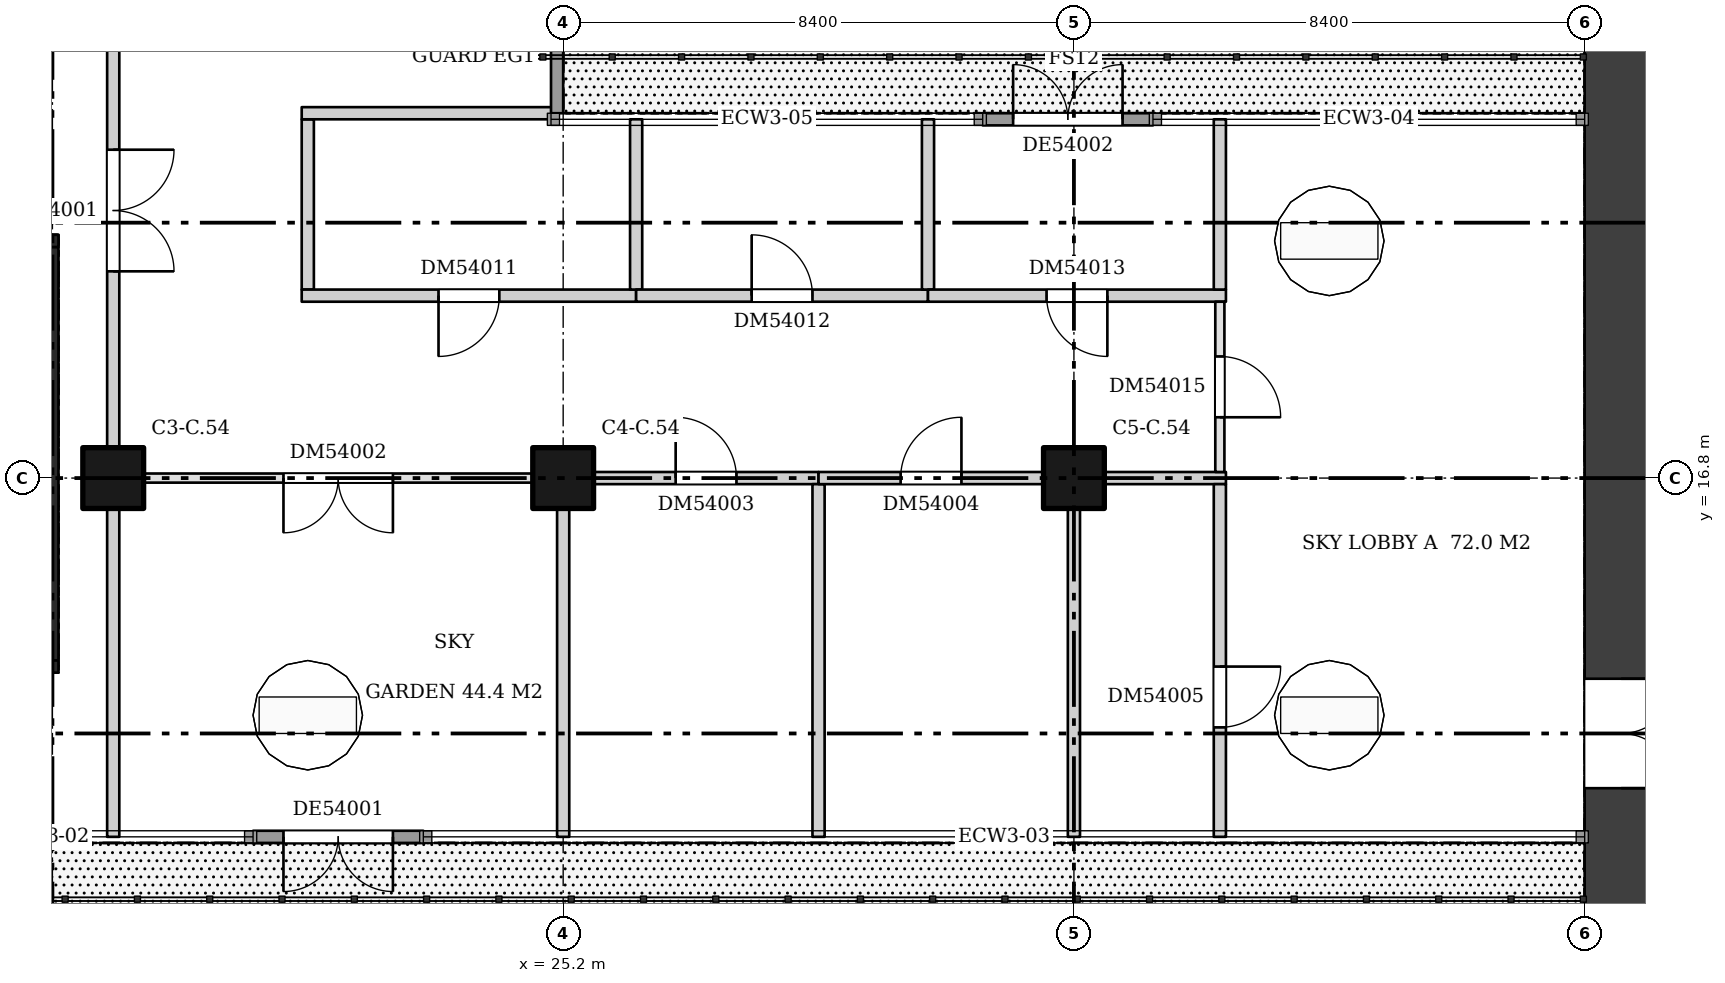
"""IFC4 building model, lengths in metres.
Left out: names, types, materials, properties, quantities, classifications, styles, units other than length and angle.
Written with IfcOpenShell. Run it as: python <this file> out.ifc"""

import sys

from ifc_helpers import new_model, si_unit, direction, frame, frame_2d, origin, origin_2d, place, context, subcontext, project, spatial, rectangle, extrude, element, fill, save


model = new_model("IFC4")
c1 = context("Model", 3, precision=1e-05, world=origin(), true_north=direction((0.0, 1.0)))
c2 = subcontext(c1, "Body", "Model", "MODEL_VIEW")
j1 = project(units=[si_unit("LENGTHUNIT", "METRE"), si_unit("PLANEANGLEUNIT", "RADIAN")], contexts=[c1])
p1 = place(None, origin())
s1 = spatial("IfcSite", under=j1, at=p1, CompositionType="ELEMENT")
p2 = place(p1, origin())
s2 = spatial("IfcBuilding", under=s1, at=p2, CompositionType="ELEMENT")
p3 = place(p2, frame((0.0, 0.0, 207.2)))
s3 = spatial("IfcBuildingStorey", under=s2, at=p3, CompositionType="ELEMENT", Elevation=207.2)
for number, where, z_axis, x_axis in (
    (1, (17.8, 16.8, 0.0), (0.0, 0.0, 1.0), (1.0, 0.0, 0.0)),
    (2, (25.2, 16.8, 0.0), (0.0, 0.0, 1.0), (1.0, 0.0, 0.0)),
    (3, (33.6, 16.8, 0.0), (0.0, 0.0, 1.0), (1.0, 0.0, 0.0)),
):
    element("IfcColumn", number, at=place(p3, frame(where, z_axis=z_axis, x_axis=x_axis)), inside=s3, PredefinedType="COLUMN", context=c2, shape_type="SweptSolid", body=[
        extrude(rectangle(XDim=1.0, YDim=1.0, at=origin_2d()), origin(), (0.0, 0.0, 1.0), 6.72),
    ])
p4 = place(p3, frame((42.6, 9.6, 0.0), z_axis=(0.0, 0.0, 1.0), x_axis=(0.0, 1.0, 0.0)))
e4 = element("IfcWall", 4, at=p4, inside=s3, PredefinedType="SHEAR", context=c2, shape_type="SweptSolid", body=[
    extrude(rectangle(XDim=14.4, YDim=1.2, at=frame_2d((7.2, 0.0))), origin(), (0.0, 0.0, 1.0), 6.72),
])
p5 = place(p4, frame((2.1, 0.0, 0.0)))
e5 = element("IfcOpeningElement", 5, at=p5, cuts=e4, PredefinedType="OPENING", context=c2, shape_type="SweptSolid", body=[
    extrude(rectangle(XDim=1.8, YDim=2.1, at=frame_2d((0.9, 1.05))), frame((0.0, 0.61, 0.0), z_axis=(0.0, -1.0, 0.0), x_axis=(1.0, 0.0, 0.0)), (0.0, 0.0, 1.0), 1.22),
])
p6 = place(p3, frame((16.8, 13.8, 0.0), z_axis=(0.0, 0.0, 1.0), x_axis=(0.0, 1.0, 0.0)))
e6 = element("IfcWall", 6, at=p6, inside=s3, PredefinedType="SHEAR", context=c2, shape_type="SweptSolid", body=[
    extrude(rectangle(XDim=6.8, YDim=0.2, at=frame_2d((3.4, 0.0))), origin(), (0.0, 0.0, 1.0), 6.72),
])
for number, where, z_axis, x_axis in (
    (7, (13.5, 13.7, 0.0), (0.0, 0.0, 1.0), (1.0, 0.0, 0.0)),
    (8, (13.5, 20.7, 0.0), (0.0, 0.0, 1.0), (1.0, 0.0, 0.0)),
):
    element("IfcWall", number, at=place(p3, frame(where, z_axis=z_axis, x_axis=x_axis)), inside=s3, PredefinedType="SHEAR", context=c2, shape_type="SweptSolid", body=[
        extrude(rectangle(XDim=3.4, YDim=0.2, at=frame_2d((1.7, 0.0))), origin(), (0.0, 0.0, 1.0), 6.72),
    ])
p7 = place(p3, frame((17.8, 10.9, 0.0), z_axis=(0.0, 0.0, 1.0), x_axis=(0.0, 1.0, 0.0)))
e9 = element("IfcWall", 9, at=p7, inside=s3, PredefinedType="PARTITIONING", context=c2, shape_type="SweptSolid", body=[
    extrude(rectangle(XDim=5.4, YDim=0.2, at=frame_2d((2.7, 0.0))), origin(), (0.0, 0.0, 1.0), 6.72),
])
p8 = place(p3, frame((17.8, 17.3, 0.0), z_axis=(0.0, 0.0, 1.0), x_axis=(0.0, 1.0, 0.0)))
e10 = element("IfcWall", 10, at=p8, inside=s3, PredefinedType="PARTITIONING", context=c2, shape_type="SweptSolid", body=[
    extrude(rectangle(XDim=7.8, YDim=0.2, at=frame_2d((3.9, 0.0))), origin(), (0.0, 0.0, 1.0), 6.72),
])
p9 = place(p8, frame((2.9, 0.0, 0.0)))
e11 = element("IfcOpeningElement", 11, at=p9, cuts=e10, PredefinedType="OPENING", context=c2, shape_type="SweptSolid", body=[
    extrude(rectangle(XDim=2.0, YDim=2.1, at=frame_2d((1.0, 1.05))), frame((0.0, 0.11, 0.0), z_axis=(0.0, -1.0, 0.0), x_axis=(1.0, 0.0, 0.0)), (0.0, 0.0, 1.0), 0.22),
])
p10 = place(p3, frame((18.3, 16.8, 0.0), z_axis=(0.0, 0.0, 1.0), x_axis=(1.0, 0.0, 0.0)))
e12 = element("IfcWall", 12, at=p10, inside=s3, PredefinedType="PARTITIONING", context=c2, shape_type="SweptSolid", body=[
    extrude(rectangle(XDim=6.4, YDim=0.15, at=frame_2d((3.2, 0.0))), origin(), (0.0, 0.0, 1.0), 6.72),
])
p11 = place(p10, frame((2.3, 0.0, 0.0)))
e13 = element("IfcOpeningElement", 13, at=p11, cuts=e12, PredefinedType="OPENING", context=c2, shape_type="SweptSolid", body=[
    extrude(rectangle(XDim=1.8, YDim=2.1, at=frame_2d((0.9, 1.05))), frame((0.0, 0.085, 0.0), z_axis=(0.0, -1.0, 0.0), x_axis=(1.0, 0.0, 0.0)), (0.0, 0.0, 1.0), 0.17),
])
p12 = place(p3, frame((21.0, 19.9, 0.0), z_axis=(0.0, 0.0, 1.0), x_axis=(0.0, 1.0, 0.0)))
e14 = element("IfcWall", 14, at=p12, inside=s3, PredefinedType="PARTITIONING", context=c2, shape_type="SweptSolid", body=[
    extrude(rectangle(XDim=2.8, YDim=0.2, at=frame_2d((1.4, 0.0))), origin(), (0.0, 0.0, 1.0), 6.72),
])
p13 = place(p3, frame((20.9, 19.8, 0.0), z_axis=(0.0, 0.0, 1.0), x_axis=(1.0, 0.0, 0.0)))
e15 = element("IfcWall", 15, at=p13, inside=s3, PredefinedType="PARTITIONING", context=c2, shape_type="SweptSolid", body=[
    extrude(rectangle(XDim=5.5, YDim=0.2, at=frame_2d((2.75, 0.0))), origin(), (0.0, 0.0, 1.0), 6.72),
])
p14 = place(p13, frame((2.25, 0.0, 0.0)))
e16 = element("IfcOpeningElement", 16, at=p14, cuts=e15, PredefinedType="OPENING", context=c2, shape_type="SweptSolid", body=[
    extrude(rectangle(XDim=1.0, YDim=2.1, at=frame_2d((0.5, 1.05))), frame((0.0, 0.11, 0.0), z_axis=(0.0, -1.0, 0.0), x_axis=(1.0, 0.0, 0.0)), (0.0, 0.0, 1.0), 0.22),
])
p15 = place(p3, frame((20.9, 22.8, 0.0), z_axis=(0.0, 0.0, 1.0), x_axis=(1.0, 0.0, 0.0)))
e17 = element("IfcWall", 17, at=p15, inside=s3, PredefinedType="PARTITIONING", context=c2, shape_type="SweptSolid", body=[
    extrude(rectangle(XDim=4.2, YDim=0.2, at=frame_2d((2.1, 0.0))), origin(), (0.0, 0.0, 1.0), 6.72),
])
p16 = place(p3, frame((25.2, 10.9, 0.0), z_axis=(0.0, 0.0, 1.0), x_axis=(0.0, 1.0, 0.0)))
e18 = element("IfcWall", 18, at=p16, inside=s3, PredefinedType="PARTITIONING", context=c2, shape_type="SweptSolid", body=[
    extrude(rectangle(XDim=5.4, YDim=0.2, at=frame_2d((2.7, 0.0))), origin(), (0.0, 0.0, 1.0), 6.72),
])
p17 = place(p3, frame((25.7, 16.8, 0.0), z_axis=(0.0, 0.0, 1.0), x_axis=(1.0, 0.0, 0.0)))
e19 = element("IfcWall", 19, at=p17, inside=s3, PredefinedType="PARTITIONING", context=c2, shape_type="SweptSolid", body=[
    extrude(rectangle(XDim=3.7, YDim=0.2, at=frame_2d((1.85, 0.0))), origin(), (0.0, 0.0, 1.0), 6.72),
])
p18 = place(p17, frame((1.35, 0.0, 0.0)))
e20 = element("IfcOpeningElement", 20, at=p18, cuts=e19, PredefinedType="OPENING", context=c2, shape_type="SweptSolid", body=[
    extrude(rectangle(XDim=1.0, YDim=2.1, at=frame_2d((0.5, 1.05))), frame((0.0, 0.11, 0.0), z_axis=(0.0, -1.0, 0.0), x_axis=(1.0, 0.0, 0.0)), (0.0, 0.0, 1.0), 0.22),
])
p19 = place(p3, frame((26.4, 19.9, 0.0), z_axis=(0.0, 0.0, 1.0), x_axis=(0.0, 1.0, 0.0)))
e21 = element("IfcWall", 21, at=p19, inside=s3, PredefinedType="PARTITIONING", context=c2, shape_type="SweptSolid", body=[
    extrude(rectangle(XDim=2.8, YDim=0.2, at=frame_2d((1.4, 0.0))), origin(), (0.0, 0.0, 1.0), 6.72),
])
p20 = place(p3, frame((26.4, 19.8, 0.0), z_axis=(0.0, 0.0, 1.0), x_axis=(1.0, 0.0, 0.0)))
e22 = element("IfcWall", 22, at=p20, inside=s3, PredefinedType="PARTITIONING", context=c2, shape_type="SweptSolid", body=[
    extrude(rectangle(XDim=4.8, YDim=0.2, at=frame_2d((2.4, 0.0))), origin(), (0.0, 0.0, 1.0), 6.72),
])
p21 = place(p20, frame((1.9, 0.0, 0.0)))
e23 = element("IfcOpeningElement", 23, at=p21, cuts=e22, PredefinedType="OPENING", context=c2, shape_type="SweptSolid", body=[
    extrude(rectangle(XDim=1.0, YDim=2.1, at=frame_2d((0.5, 1.05))), frame((0.0, 0.11, 0.0), z_axis=(0.0, -1.0, 0.0), x_axis=(1.0, 0.0, 0.0)), (0.0, 0.0, 1.0), 0.22),
])
p22 = place(p3, frame((29.4, 10.9, 0.0), z_axis=(0.0, 0.0, 1.0), x_axis=(0.0, 1.0, 0.0)))
e24 = element("IfcWall", 24, at=p22, inside=s3, PredefinedType="PARTITIONING", context=c2, shape_type="SweptSolid", body=[
    extrude(rectangle(XDim=5.8, YDim=0.2, at=frame_2d((2.9, 0.0))), origin(), (0.0, 0.0, 1.0), 6.72),
])
p23 = place(p3, frame((29.4, 16.8, 0.0), z_axis=(0.0, 0.0, 1.0), x_axis=(1.0, 0.0, 0.0)))
e25 = element("IfcWall", 25, at=p23, inside=s3, PredefinedType="PARTITIONING", context=c2, shape_type="SweptSolid", body=[
    extrude(rectangle(XDim=3.7, YDim=0.2, at=frame_2d((1.85, 0.0))), origin(), (0.0, 0.0, 1.0), 6.72),
])
p24 = place(p23, frame((1.35, 0.0, 0.0)))
e26 = element("IfcOpeningElement", 26, at=p24, cuts=e25, PredefinedType="OPENING", context=c2, shape_type="SweptSolid", body=[
    extrude(rectangle(XDim=1.0, YDim=2.1, at=frame_2d((0.5, 1.05))), frame((0.0, 0.11, 0.0), z_axis=(0.0, -1.0, 0.0), x_axis=(1.0, 0.0, 0.0)), (0.0, 0.0, 1.0), 0.22),
])
p25 = place(p3, frame((31.2, 19.9, 0.0), z_axis=(0.0, 0.0, 1.0), x_axis=(0.0, 1.0, 0.0)))
e27 = element("IfcWall", 27, at=p25, inside=s3, PredefinedType="PARTITIONING", context=c2, shape_type="SweptSolid", body=[
    extrude(rectangle(XDim=2.8, YDim=0.2, at=frame_2d((1.4, 0.0))), origin(), (0.0, 0.0, 1.0), 6.72),
])
p26 = place(p3, frame((31.2, 19.8, 0.0), z_axis=(0.0, 0.0, 1.0), x_axis=(1.0, 0.0, 0.0)))
e28 = element("IfcWall", 28, at=p26, inside=s3, PredefinedType="PARTITIONING", context=c2, shape_type="SweptSolid", body=[
    extrude(rectangle(XDim=4.9, YDim=0.2, at=frame_2d((2.45, 0.0))), origin(), (0.0, 0.0, 1.0), 6.72),
])
p27 = place(p26, frame((1.95, 0.0, 0.0)))
e29 = element("IfcOpeningElement", 29, at=p27, cuts=e28, PredefinedType="OPENING", context=c2, shape_type="SweptSolid", body=[
    extrude(rectangle(XDim=1.0, YDim=2.1, at=frame_2d((0.5, 1.05))), frame((0.0, 0.11, 0.0), z_axis=(0.0, -1.0, 0.0), x_axis=(1.0, 0.0, 0.0)), (0.0, 0.0, 1.0), 0.22),
])
p28 = place(p3, frame((33.6, 10.9, 0.0), z_axis=(0.0, 0.0, 1.0), x_axis=(0.0, 1.0, 0.0)))
e30 = element("IfcWall", 30, at=p28, inside=s3, PredefinedType="PARTITIONING", context=c2, shape_type="SweptSolid", body=[
    extrude(rectangle(XDim=5.4, YDim=0.2, at=frame_2d((2.7, 0.0))), origin(), (0.0, 0.0, 1.0), 6.72),
])
p29 = place(p3, frame((34.1, 16.8, 0.0), z_axis=(0.0, 0.0, 1.0), x_axis=(1.0, 0.0, 0.0)))
e31 = element("IfcWall", 31, at=p29, inside=s3, PredefinedType="PARTITIONING", context=c2, shape_type="SweptSolid", body=[
    extrude(rectangle(XDim=2.0, YDim=0.2, at=frame_2d((1.0, 0.0))), origin(), (0.0, 0.0, 1.0), 6.72),
])
p30 = place(p3, frame((36.0, 10.9, 0.0), z_axis=(0.0, 0.0, 1.0), x_axis=(0.0, 1.0, 0.0)))
e32 = element("IfcWall", 32, at=p30, inside=s3, PredefinedType="PARTITIONING", context=c2, shape_type="SweptSolid", body=[
    extrude(rectangle(XDim=5.8, YDim=0.2, at=frame_2d((2.9, 0.0))), origin(), (0.0, 0.0, 1.0), 6.72),
])
p31 = place(p30, frame((1.8, 0.0, 0.0)))
e33 = element("IfcOpeningElement", 33, at=p31, cuts=e32, PredefinedType="OPENING", context=c2, shape_type="SweptSolid", body=[
    extrude(rectangle(XDim=1.0, YDim=2.1, at=frame_2d((0.5, 1.05))), frame((0.0, 0.11, 0.0), z_axis=(0.0, -1.0, 0.0), x_axis=(1.0, 0.0, 0.0)), (0.0, 0.0, 1.0), 0.22),
])
p32 = place(p3, frame((36.0, 16.9, 0.0), z_axis=(0.0, 0.0, 1.0), x_axis=(0.0, 1.0, 0.0)))
e34 = element("IfcWall", 34, at=p32, inside=s3, PredefinedType="PARTITIONING", context=c2, shape_type="SweptSolid", body=[
    extrude(rectangle(XDim=2.8, YDim=0.15, at=frame_2d((1.4, 0.0))), origin(), (0.0, 0.0, 1.0), 6.72),
])
p33 = place(p32, frame((0.9, 0.0, 0.0)))
e35 = element("IfcOpeningElement", 35, at=p33, cuts=e34, PredefinedType="OPENING", context=c2, shape_type="SweptSolid", body=[
    extrude(rectangle(XDim=1.0, YDim=2.1, at=frame_2d((0.5, 1.05))), frame((0.0, 0.085, 0.0), z_axis=(0.0, -1.0, 0.0), x_axis=(1.0, 0.0, 0.0)), (0.0, 0.0, 1.0), 0.17),
])
p34 = place(p3, frame((36.0, 19.9, 0.0), z_axis=(0.0, 0.0, 1.0), x_axis=(0.0, 1.0, 0.0)))
e36 = element("IfcWall", 36, at=p34, inside=s3, PredefinedType="PARTITIONING", context=c2, shape_type="SweptSolid", body=[
    extrude(rectangle(XDim=2.8, YDim=0.2, at=frame_2d((1.4, 0.0))), origin(), (0.0, 0.0, 1.0), 6.72),
])
p35 = place(p3, frame((20.1, 10.9, 0.0), z_axis=(0.0, 0.0, 1.0), x_axis=(1.0, 0.0, 0.0)))
e37 = element("IfcWall", 37, at=p35, inside=s3, PredefinedType="SOLIDWALL", context=c2, shape_type="SweptSolid", body=[
    extrude(rectangle(XDim=2.8, YDim=0.2, at=frame_2d((1.4, 0.0))), origin(), (0.0, 0.0, 1.0), 6.72),
])
p36 = place(p35, frame((0.5, 0.0, 0.0)))
e38 = element("IfcOpeningElement", 38, at=p36, cuts=e37, PredefinedType="OPENING", context=c2, shape_type="SweptSolid", body=[
    extrude(rectangle(XDim=1.8, YDim=2.4, at=frame_2d((0.9, 1.2))), frame((0.0, 0.11, 0.0), z_axis=(0.0, -1.0, 0.0), x_axis=(1.0, 0.0, 0.0)), (0.0, 0.0, 1.0), 0.22),
])
p37 = place(p3, frame((34.9, 22.7, 0.0), z_axis=(0.0, 0.0, 1.0), x_axis=(-1.0, 0.0, 0.0)))
e39 = element("IfcWall", 39, at=p37, inside=s3, PredefinedType="SOLIDWALL", context=c2, shape_type="SweptSolid", body=[
    extrude(rectangle(XDim=2.8, YDim=0.2, at=frame_2d((1.4, 0.0))), origin(), (0.0, 0.0, 1.0), 6.72),
])
p38 = place(p37, frame((0.5, 0.0, 0.0)))
e40 = element("IfcOpeningElement", 40, at=p38, cuts=e39, PredefinedType="OPENING", context=c2, shape_type="SweptSolid", body=[
    extrude(rectangle(XDim=1.8, YDim=2.4, at=frame_2d((0.9, 1.2))), frame((0.0, 0.11, 0.0), z_axis=(0.0, -1.0, 0.0), x_axis=(1.0, 0.0, 0.0)), (0.0, 0.0, 1.0), 0.22),
])
p39 = place(p3, frame((25.1, 22.8, 0.0), z_axis=(0.0, 0.0, 1.0), x_axis=(0.0, 1.0, 0.0)))
e41 = element("IfcWall", 41, at=p39, inside=s3, PredefinedType="SOLIDWALL", context=c2, shape_type="SweptSolid", body=[
    extrude(rectangle(XDim=1.85, YDim=0.2, at=frame_2d((0.925, 0.0))), origin(), (0.0, 0.0, 1.0), 6.72),
])
p40 = place(p5, frame((1.8, 0.0, 0.0), z_axis=(0.0, 0.0, 1.0), x_axis=(-1.0, 0.0, 0.0)))
e42 = element("IfcDoor", 42, at=p40, inside=s3, OperationType="DOUBLE_DOOR_SINGLE_SWING", PredefinedType="DOOR", context=c2, shape_type="SweptSolid", body=[
    extrude(rectangle(XDim=1.8, YDim=2.1, at=frame_2d((0.9, 1.05))), frame((0.0, 0.025, 0.0), z_axis=(0.0, -1.0, 0.0), x_axis=(1.0, 0.0, 0.0)), (0.0, 0.0, 1.0), 0.05),
])
fill(e5, e42)
p41 = place(p9, frame((2.0, 0.0, 0.0), z_axis=(0.0, 0.0, 1.0), x_axis=(-1.0, 0.0, 0.0)))
e43 = element("IfcDoor", 43, at=p41, inside=s3, OperationType="DOUBLE_DOOR_SINGLE_SWING", PredefinedType="DOOR", context=c2, shape_type="SweptSolid", body=[
    extrude(rectangle(XDim=2.0, YDim=2.1, at=frame_2d((1.0, 1.05))), frame((0.0, 0.025, 0.0), z_axis=(0.0, -1.0, 0.0), x_axis=(1.0, 0.0, 0.0)), (0.0, 0.0, 1.0), 0.05),
])
fill(e11, e43)
p42 = place(p11, frame((1.8, 0.0, 0.0), z_axis=(0.0, 0.0, 1.0), x_axis=(-1.0, 0.0, 0.0)))
e44 = element("IfcDoor", 44, at=p42, inside=s3, OperationType="DOUBLE_DOOR_SINGLE_SWING", PredefinedType="DOOR", context=c2, shape_type="SweptSolid", body=[
    extrude(rectangle(XDim=1.8, YDim=2.1, at=frame_2d((0.9, 1.05))), frame((0.0, 0.025, 0.0), z_axis=(0.0, -1.0, 0.0), x_axis=(1.0, 0.0, 0.0)), (0.0, 0.0, 1.0), 0.05),
])
fill(e13, e44)
p43 = place(p18, origin())
e45 = element("IfcDoor", 45, at=p43, inside=s3, OperationType="SINGLE_SWING_LEFT", PredefinedType="DOOR", context=c2, shape_type="SweptSolid", body=[
    extrude(rectangle(XDim=1.0, YDim=2.1, at=frame_2d((0.5, 1.05))), frame((0.0, 0.025, 0.0), z_axis=(0.0, -1.0, 0.0), x_axis=(1.0, 0.0, 0.0)), (0.0, 0.0, 1.0), 0.05),
])
fill(e20, e45)
p44 = place(p24, origin())
e46 = element("IfcDoor", 46, at=p44, inside=s3, OperationType="SINGLE_SWING_RIGHT", PredefinedType="DOOR", context=c2, shape_type="SweptSolid", body=[
    extrude(rectangle(XDim=1.0, YDim=2.1, at=frame_2d((0.5, 1.05))), frame((0.0, 0.025, 0.0), z_axis=(0.0, -1.0, 0.0), x_axis=(1.0, 0.0, 0.0)), (0.0, 0.0, 1.0), 0.05),
])
fill(e26, e46)
p45 = place(p31, frame((1.0, 0.0, 0.0), z_axis=(0.0, 0.0, 1.0), x_axis=(-1.0, 0.0, 0.0)))
e47 = element("IfcDoor", 47, at=p45, inside=s3, OperationType="SINGLE_SWING_LEFT", PredefinedType="DOOR", context=c2, shape_type="SweptSolid", body=[
    extrude(rectangle(XDim=1.0, YDim=2.1, at=frame_2d((0.5, 1.05))), frame((0.0, 0.025, 0.0), z_axis=(0.0, -1.0, 0.0), x_axis=(1.0, 0.0, 0.0)), (0.0, 0.0, 1.0), 0.05),
])
fill(e33, e47)
p46 = place(p14, frame((1.0, 0.0, 0.0), z_axis=(0.0, 0.0, 1.0), x_axis=(-1.0, 0.0, 0.0)))
e48 = element("IfcDoor", 48, at=p46, inside=s3, OperationType="SINGLE_SWING_RIGHT", PredefinedType="DOOR", context=c2, shape_type="SweptSolid", body=[
    extrude(rectangle(XDim=1.0, YDim=2.1, at=frame_2d((0.5, 1.05))), frame((0.0, 0.025, 0.0), z_axis=(0.0, -1.0, 0.0), x_axis=(1.0, 0.0, 0.0)), (0.0, 0.0, 1.0), 0.05),
])
fill(e16, e48)
p47 = place(p21, origin())
e49 = element("IfcDoor", 49, at=p47, inside=s3, OperationType="SINGLE_SWING_LEFT", PredefinedType="DOOR", context=c2, shape_type="SweptSolid", body=[
    extrude(rectangle(XDim=1.0, YDim=2.1, at=frame_2d((0.5, 1.05))), frame((0.0, 0.025, 0.0), z_axis=(0.0, -1.0, 0.0), x_axis=(1.0, 0.0, 0.0)), (0.0, 0.0, 1.0), 0.05),
])
fill(e23, e49)
p48 = place(p27, frame((1.0, 0.0, 0.0), z_axis=(0.0, 0.0, 1.0), x_axis=(-1.0, 0.0, 0.0)))
e50 = element("IfcDoor", 50, at=p48, inside=s3, OperationType="SINGLE_SWING_LEFT", PredefinedType="DOOR", context=c2, shape_type="SweptSolid", body=[
    extrude(rectangle(XDim=1.0, YDim=2.1, at=frame_2d((0.5, 1.05))), frame((0.0, 0.025, 0.0), z_axis=(0.0, -1.0, 0.0), x_axis=(1.0, 0.0, 0.0)), (0.0, 0.0, 1.0), 0.05),
])
fill(e29, e50)
p49 = place(p33, frame((1.0, 0.0, 0.0), z_axis=(0.0, 0.0, 1.0), x_axis=(-1.0, 0.0, 0.0)))
e51 = element("IfcDoor", 51, at=p49, inside=s3, OperationType="SINGLE_SWING_RIGHT", PredefinedType="DOOR", context=c2, shape_type="SweptSolid", body=[
    extrude(rectangle(XDim=1.0, YDim=2.1, at=frame_2d((0.5, 1.05))), frame((0.0, 0.025, 0.0), z_axis=(0.0, -1.0, 0.0), x_axis=(1.0, 0.0, 0.0)), (0.0, 0.0, 1.0), 0.05),
])
fill(e35, e51)
p50 = place(p36, frame((1.8, 0.0, 0.0), z_axis=(0.0, 0.0, 1.0), x_axis=(-1.0, 0.0, 0.0)))
e52 = element("IfcDoor", 52, at=p50, inside=s3, OperationType="DOUBLE_DOOR_SINGLE_SWING", PredefinedType="DOOR", context=c2, shape_type="SweptSolid", body=[
    extrude(rectangle(XDim=1.8, YDim=2.4, at=frame_2d((0.9, 1.2))), frame((0.0, 0.025, 0.0), z_axis=(0.0, -1.0, 0.0), x_axis=(1.0, 0.0, 0.0)), (0.0, 0.0, 1.0), 0.05),
])
fill(e38, e52)
p51 = place(p38, frame((1.8, 0.0, 0.0), z_axis=(0.0, 0.0, 1.0), x_axis=(-1.0, 0.0, 0.0)))
e53 = element("IfcDoor", 53, at=p51, inside=s3, OperationType="DOUBLE_DOOR_SINGLE_SWING", PredefinedType="DOOR", context=c2, shape_type="SweptSolid", body=[
    extrude(rectangle(XDim=1.8, YDim=2.4, at=frame_2d((0.9, 1.2))), frame((0.0, 0.025, 0.0), z_axis=(0.0, -1.0, 0.0), x_axis=(1.0, 0.0, 0.0)), (0.0, 0.0, 1.0), 0.05),
])
fill(e40, e53)
save(model, sys.argv[1])
